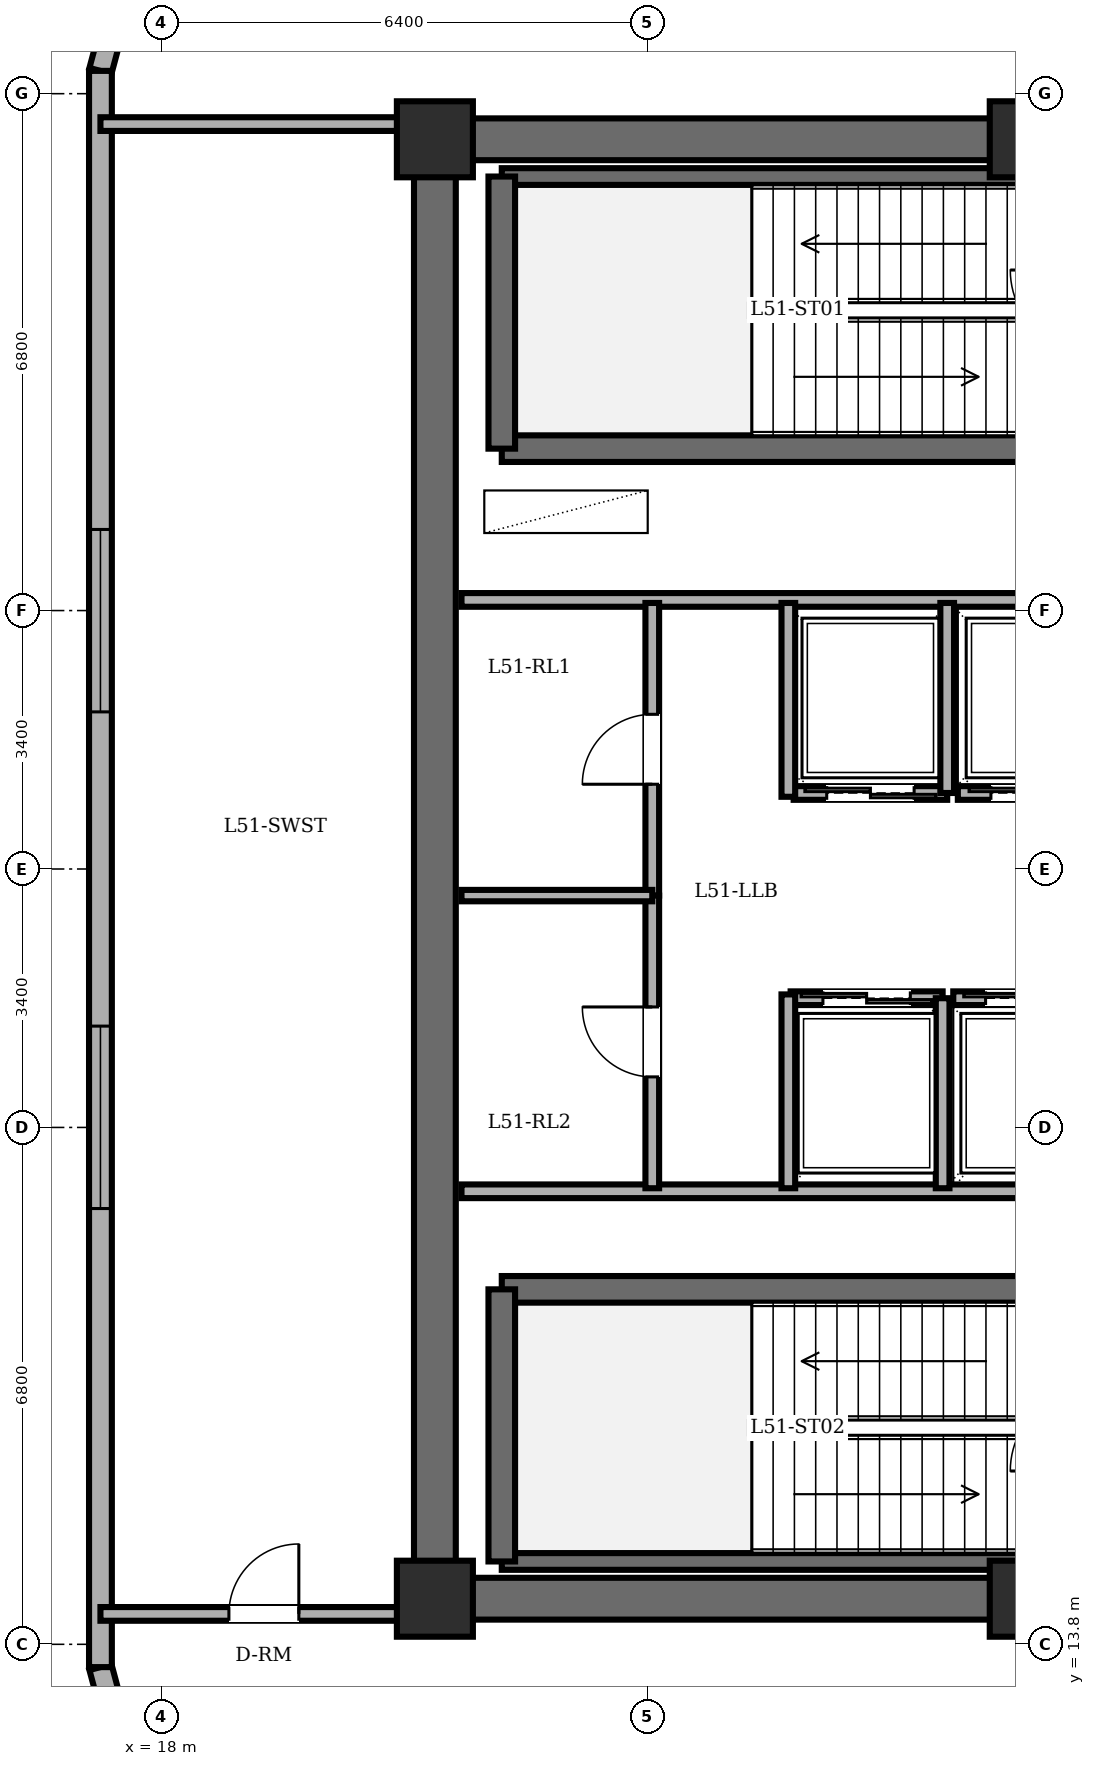
"""IFC4 building model, lengths in metres.
Left out: names, types, materials, properties, quantities, classifications, styles, units other than length and angle.
Written with IfcOpenShell. Run it as: python <this file> out.ifc"""

import sys

from ifc_helpers import new_model, si_unit, direction, frame, frame_2d, origin, origin_2d, place, context, subcontext, project, spatial, rectangle, extrude, element, fill, save


model = new_model("IFC4")
c1 = context("Model", 3, precision=1e-05, world=origin(), true_north=direction((0.0, 1.0)))
c2 = subcontext(c1, "Body", "Model", "MODEL_VIEW")
j1 = project(units=[si_unit("LENGTHUNIT", "METRE"), si_unit("PLANEANGLEUNIT", "RADIAN")], contexts=[c1])
p1 = place(None, origin())
s1 = spatial("IfcSite", under=j1, at=p1, CompositionType="ELEMENT")
p2 = place(p1, origin())
s2 = spatial("IfcBuilding", under=s1, at=p2, CompositionType="ELEMENT")
p3 = place(p2, frame((0.0, 0.0, 196.2)))
s3 = spatial("IfcBuildingStorey", under=s2, at=p3, CompositionType="ELEMENT", Elevation=196.2)
for number, where, z_axis, x_axis in (
    (1, (21.6, 14.4, 0.0), (0.0, 0.0, 1.0), (1.0, 0.0, 0.0)),
    (2, (29.4, 14.4, 0.0), (0.0, 0.0, 1.0), (1.0, 0.0, 0.0)),
    (3, (29.4, 33.6, 0.0), (0.0, 0.0, 1.0), (1.0, 0.0, 0.0)),
    (4, (21.6, 33.6, 0.0), (0.0, 0.0, 1.0), (1.0, 0.0, 0.0)),
):
    element("IfcColumn", number, at=place(p3, frame(where, z_axis=z_axis, x_axis=x_axis)), inside=s3, PredefinedType="COLUMN", context=c2, shape_type="SweptSolid", body=[
        extrude(rectangle(XDim=1.0, YDim=1.0, at=origin_2d()), origin(), (0.0, 0.0, 1.0), 5.1),
    ])
for number, where, z_axis, x_axis in (
    (5, (17.2, 13.5, 0.0), (0.0, 0.0, 1.0), (0.259, -0.966, 0.0)),
    (6, (17.897, 37.1, 0.0), (0.0, 0.0, 1.0), (-0.259, -0.966, 0.0)),
):
    element("IfcWall", number, at=place(p3, frame(where, z_axis=z_axis, x_axis=x_axis)), inside=s3, PredefinedType="SOLIDWALL", context=c2, shape_type="SweptSolid", body=[
        extrude(rectangle(XDim=2.692, YDim=0.3, at=frame_2d((1.346, 0.0))), origin(), (0.0, 0.0, 1.0), 4.9),
    ])
p4 = place(p3, frame((17.2, 34.5, 0.0), z_axis=(0.0, 0.0, 1.0), x_axis=(0.0, -1.0, 0.0)))
e7 = element("IfcWall", 7, at=p4, inside=s3, PredefinedType="SOLIDWALL", context=c2, shape_type="SweptSolid", body=[
    extrude(rectangle(XDim=21.0, YDim=0.3, at=frame_2d((10.5, 0.0))), origin(), (0.0, 0.0, 1.0), 4.9),
])
p5 = place(p4, frame((6.033, 0.0, 0.85)))
e8 = element("IfcOpeningElement", 8, at=p5, cuts=e7, PredefinedType="OPENING", context=c2, shape_type="SweptSolid", body=[
    extrude(rectangle(XDim=2.4, YDim=2.1, at=frame_2d((1.2, 1.05))), frame((0.0, 0.16, 0.0), z_axis=(0.0, -1.0, 0.0), x_axis=(1.0, 0.0, 0.0)), (0.0, 0.0, 1.0), 0.32),
])
p6 = place(p4, frame((12.567, 0.0, 0.85)))
e9 = element("IfcOpeningElement", 9, at=p6, cuts=e7, PredefinedType="OPENING", context=c2, shape_type="SweptSolid", body=[
    extrude(rectangle(XDim=2.4, YDim=2.1, at=frame_2d((1.2, 1.05))), frame((0.0, 0.16, 0.0), z_axis=(0.0, -1.0, 0.0), x_axis=(1.0, 0.0, 0.0)), (0.0, 0.0, 1.0), 0.32),
])
p7 = place(p3, frame((21.6, 14.4, 0.0), z_axis=(0.0, 0.0, 1.0), x_axis=(0.0, 1.0, 0.0)))
e10 = element("IfcWall", 10, at=p7, inside=s3, PredefinedType="SHEAR", context=c2, shape_type="SweptSolid", body=[
    extrude(rectangle(XDim=19.2, YDim=0.55, at=frame_2d((9.6, 0.0))), origin(), (0.0, 0.0, 1.0), 4.9),
])
for number, where, z_axis, x_axis in (
    (11, (21.6, 33.6, 0.0), (0.0, 0.0, 1.0), (1.0, 0.0, 0.0)),
    (12, (37.2, 14.4, 0.0), (0.0, 0.0, 1.0), (-1.0, 0.0, 0.0)),
):
    element("IfcWall", number, at=place(p3, frame(where, z_axis=z_axis, x_axis=x_axis)), inside=s3, PredefinedType="SHEAR", context=c2, shape_type="SweptSolid", body=[
        extrude(rectangle(XDim=15.6, YDim=0.55, at=frame_2d((7.8, 0.0))), origin(), (0.0, 0.0, 1.0), 4.9),
    ])
p8 = place(p3, frame((22.48, 29.53, 0.0), z_axis=(0.0, 0.0, 1.0), x_axis=(1.0, 0.0, 0.0)))
e13 = element("IfcWall", 13, at=p8, inside=s3, PredefinedType="SOLIDWALL", context=c2, shape_type="SweptSolid", body=[
    extrude(rectangle(XDim=7.79, YDim=0.35, at=frame_2d((3.895, 0.0))), origin(), (0.0, 0.0, 1.0), 4.9),
])
p9 = place(p3, frame((22.48, 33.11, 0.0), z_axis=(0.0, 0.0, 1.0), x_axis=(1.0, 0.0, 0.0)))
e14 = element("IfcWall", 14, at=p9, inside=s3, PredefinedType="PARTITIONING", context=c2, shape_type="SweptSolid", body=[
    extrude(rectangle(XDim=7.79, YDim=0.22, at=frame_2d((3.895, 0.0))), origin(), (0.0, 0.0, 1.0), 4.9),
])
p10 = place(p3, frame((22.48, 29.53, 0.0), z_axis=(0.0, 0.0, 1.0), x_axis=(0.0, 1.0, 0.0)))
e15 = element("IfcWall", 15, at=p10, inside=s3, PredefinedType="SOLIDWALL", context=c2, shape_type="SweptSolid", body=[
    extrude(rectangle(XDim=3.58, YDim=0.35, at=frame_2d((1.79, 0.0))), origin(), (0.0, 0.0, 1.0), 4.9),
])
p11 = place(p3, frame((22.48, 18.47, 0.0), z_axis=(0.0, 0.0, 1.0), x_axis=(1.0, 0.0, 0.0)))
e16 = element("IfcWall", 16, at=p11, inside=s3, PredefinedType="SOLIDWALL", context=c2, shape_type="SweptSolid", body=[
    extrude(rectangle(XDim=7.79, YDim=0.35, at=frame_2d((3.895, 0.0))), origin(), (0.0, 0.0, 1.0), 4.9),
])
p12 = place(p3, frame((22.48, 14.89, 0.0), z_axis=(0.0, 0.0, 1.0), x_axis=(1.0, 0.0, 0.0)))
e17 = element("IfcWall", 17, at=p12, inside=s3, PredefinedType="PARTITIONING", context=c2, shape_type="SweptSolid", body=[
    extrude(rectangle(XDim=7.79, YDim=0.22, at=frame_2d((3.895, 0.0))), origin(), (0.0, 0.0, 1.0), 4.9),
])
p13 = place(p3, frame((22.48, 14.89, 0.0), z_axis=(0.0, 0.0, 1.0), x_axis=(0.0, 1.0, 0.0)))
e18 = element("IfcWall", 18, at=p13, inside=s3, PredefinedType="SOLIDWALL", context=c2, shape_type="SweptSolid", body=[
    extrude(rectangle(XDim=3.58, YDim=0.35, at=frame_2d((1.79, 0.0))), origin(), (0.0, 0.0, 1.0), 4.9),
])
p14 = place(p3, frame((21.95, 27.54, 0.0), z_axis=(0.0, 0.0, 1.0), x_axis=(1.0, 0.0, 0.0)))
e19 = element("IfcWall", 19, at=p14, inside=s3, PredefinedType="PARTITIONING", context=c2, shape_type="SweptSolid", body=[
    extrude(rectangle(XDim=10.56, YDim=0.18, at=frame_2d((5.28, 0.0))), origin(), (0.0, 0.0, 1.0), 4.9),
])
p15 = place(p3, frame((21.95, 19.76, 0.0), z_axis=(0.0, 0.0, 1.0), x_axis=(1.0, 0.0, 0.0)))
e20 = element("IfcWall", 20, at=p15, inside=s3, PredefinedType="PARTITIONING", context=c2, shape_type="SweptSolid", body=[
    extrude(rectangle(XDim=14.87, YDim=0.18, at=frame_2d((7.435, 0.0))), origin(), (0.0, 0.0, 1.0), 4.9),
])
p16 = place(p3, frame((28.34, 25.0, 0.0), z_axis=(0.0, 0.0, 1.0), x_axis=(-1.0, 0.0, 0.0)))
e21 = element("IfcWall", 21, at=p16, inside=s3, PredefinedType="PARTITIONING", context=c2, shape_type="SweptSolid", body=[
    extrude(rectangle(XDim=2.02, YDim=0.18, at=frame_2d((1.01, 0.0))), origin(), (0.0, 0.0, 1.0), 4.9),
])
p17 = place(p16, frame((0.435, 0.0, 0.0)))
e22 = element("IfcOpeningElement", 22, at=p17, cuts=e21, PredefinedType="OPENING", context=c2, shape_type="SweptSolid", body=[
    extrude(rectangle(XDim=1.15, YDim=2.2, at=frame_2d((0.575, 1.1))), frame((0.0, 0.1, 0.0), z_axis=(0.0, -1.0, 0.0), x_axis=(1.0, 0.0, 0.0)), (0.0, 0.0, 1.0), 0.2),
])
p18 = place(p3, frame((28.34, 25.0, 0.0), z_axis=(0.0, 0.0, 1.0), x_axis=(0.0, 1.0, 0.0)))
e23 = element("IfcWall", 23, at=p18, inside=s3, PredefinedType="PARTITIONING", context=c2, shape_type="SweptSolid", body=[
    extrude(rectangle(XDim=2.5, YDim=0.18, at=frame_2d((1.25, 0.0))), origin(), (0.0, 0.0, 1.0), 4.9),
])
p19 = place(p3, frame((30.5, 25.0, 0.0), z_axis=(0.0, 0.0, 1.0), x_axis=(-1.0, 0.0, 0.0)))
e24 = element("IfcWall", 24, at=p19, inside=s3, PredefinedType="PARTITIONING", context=c2, shape_type="SweptSolid", body=[
    extrude(rectangle(XDim=2.02, YDim=0.18, at=frame_2d((1.01, 0.0))), origin(), (0.0, 0.0, 1.0), 4.9),
])
p20 = place(p19, frame((0.435, 0.0, 0.0)))
e25 = element("IfcOpeningElement", 25, at=p20, cuts=e24, PredefinedType="OPENING", context=c2, shape_type="SweptSolid", body=[
    extrude(rectangle(XDim=1.15, YDim=2.2, at=frame_2d((0.575, 1.1))), frame((0.0, 0.1, 0.0), z_axis=(0.0, -1.0, 0.0), x_axis=(1.0, 0.0, 0.0)), (0.0, 0.0, 1.0), 0.2),
])
p21 = place(p3, frame((26.28, 22.3, 0.0), z_axis=(0.0, 0.0, 1.0), x_axis=(1.0, 0.0, 0.0)))
e26 = element("IfcWall", 26, at=p21, inside=s3, PredefinedType="PARTITIONING", context=c2, shape_type="SweptSolid", body=[
    extrude(rectangle(XDim=2.0, YDim=0.18, at=frame_2d((1.0, 0.0))), origin(), (0.0, 0.0, 1.0), 4.9),
])
p22 = place(p21, frame((0.425, 0.0, 0.0)))
e27 = element("IfcOpeningElement", 27, at=p22, cuts=e26, PredefinedType="OPENING", context=c2, shape_type="SweptSolid", body=[
    extrude(rectangle(XDim=1.15, YDim=2.2, at=frame_2d((0.575, 1.1))), frame((0.0, 0.1, 0.0), z_axis=(0.0, -1.0, 0.0), x_axis=(1.0, 0.0, 0.0)), (0.0, 0.0, 1.0), 0.2),
])
p23 = place(p3, frame((28.28, 19.8, 0.0), z_axis=(0.0, 0.0, 1.0), x_axis=(0.0, 1.0, 0.0)))
e28 = element("IfcWall", 28, at=p23, inside=s3, PredefinedType="PARTITIONING", context=c2, shape_type="SweptSolid", body=[
    extrude(rectangle(XDim=2.5, YDim=0.18, at=frame_2d((1.25, 0.0))), origin(), (0.0, 0.0, 1.0), 4.9),
])
p24 = place(p3, frame((28.42, 22.3, 0.0), z_axis=(0.0, 0.0, 1.0), x_axis=(1.0, 0.0, 0.0)))
e29 = element("IfcWall", 29, at=p24, inside=s3, PredefinedType="PARTITIONING", context=c2, shape_type="SweptSolid", body=[
    extrude(rectangle(XDim=2.0, YDim=0.18, at=frame_2d((1.0, 0.0))), origin(), (0.0, 0.0, 1.0), 4.9),
])
p25 = place(p24, frame((0.425, 0.0, 0.0)))
e30 = element("IfcOpeningElement", 30, at=p25, cuts=e29, PredefinedType="OPENING", context=c2, shape_type="SweptSolid", body=[
    extrude(rectangle(XDim=1.15, YDim=2.2, at=frame_2d((0.575, 1.1))), frame((0.0, 0.1, 0.0), z_axis=(0.0, -1.0, 0.0), x_axis=(1.0, 0.0, 0.0)), (0.0, 0.0, 1.0), 0.2),
])
p26 = place(p3, frame((24.46, 23.65, 0.0), z_axis=(0.0, 0.0, 1.0), x_axis=(0.0, 1.0, 0.0)))
e31 = element("IfcWall", 31, at=p26, inside=s3, PredefinedType="PARTITIONING", context=c2, shape_type="SweptSolid", body=[
    extrude(rectangle(XDim=3.85, YDim=0.18, at=frame_2d((1.925, 0.0))), origin(), (0.0, 0.0, 1.0), 4.9),
])
p27 = place(p26, frame((1.465, 0.0, 0.0)))
e32 = element("IfcOpeningElement", 32, at=p27, cuts=e31, PredefinedType="OPENING", context=c2, shape_type="SweptSolid", body=[
    extrude(rectangle(XDim=0.92, YDim=2.1, at=frame_2d((0.46, 1.05))), frame((0.0, 0.1, 0.0), z_axis=(0.0, -1.0, 0.0), x_axis=(1.0, 0.0, 0.0)), (0.0, 0.0, 1.0), 0.2),
])
p28 = place(p3, frame((24.46, 19.8, 0.0), z_axis=(0.0, 0.0, 1.0), x_axis=(0.0, 1.0, 0.0)))
e33 = element("IfcWall", 33, at=p28, inside=s3, PredefinedType="PARTITIONING", context=c2, shape_type="SweptSolid", body=[
    extrude(rectangle(XDim=3.85, YDim=0.18, at=frame_2d((1.925, 0.0))), origin(), (0.0, 0.0, 1.0), 4.9),
])
p29 = place(p28, frame((1.465, 0.0, 0.0)))
e34 = element("IfcOpeningElement", 34, at=p29, cuts=e33, PredefinedType="OPENING", context=c2, shape_type="SweptSolid", body=[
    extrude(rectangle(XDim=0.92, YDim=2.1, at=frame_2d((0.46, 1.05))), frame((0.0, 0.1, 0.0), z_axis=(0.0, -1.0, 0.0), x_axis=(1.0, 0.0, 0.0)), (0.0, 0.0, 1.0), 0.2),
])
p30 = place(p3, frame((21.95, 23.65, 0.0), z_axis=(0.0, 0.0, 1.0), x_axis=(1.0, 0.0, 0.0)))
e35 = element("IfcWall", 35, at=p30, inside=s3, PredefinedType="PARTITIONING", context=c2, shape_type="SweptSolid", body=[
    extrude(rectangle(XDim=2.51, YDim=0.15, at=frame_2d((1.255, 0.0))), origin(), (0.0, 0.0, 1.0), 4.9),
])
for number, where, z_axis, x_axis in (
    (36, (26.25, 24.95, 0.0), (0.0, 0.0, 1.0), (0.0, 1.0, 0.0)),
    (37, (26.25, 19.8, 0.0), (0.0, 0.0, 1.0), (0.0, 1.0, 0.0)),
):
    element("IfcWall", number, at=place(p3, frame(where, z_axis=z_axis, x_axis=x_axis)), inside=s3, PredefinedType="PARTITIONING", context=c2, shape_type="SweptSolid", body=[
        extrude(rectangle(XDim=2.55, YDim=0.18, at=frame_2d((1.275, 0.0))), origin(), (0.0, 0.0, 1.0), 4.9),
    ])
p31 = place(p3, frame((17.2, 14.2, 0.0), z_axis=(0.0, 0.0, 1.0), x_axis=(1.0, 0.0, 0.0)))
e38 = element("IfcWall", 38, at=p31, inside=s3, PredefinedType="PARTITIONING", context=c2, shape_type="SweptSolid", body=[
    extrude(rectangle(XDim=4.3, YDim=0.18, at=frame_2d((2.15, 0.0))), origin(), (0.0, 0.0, 1.0), 4.9),
])
p32 = place(p31, frame((1.69, 0.0, 0.0)))
e39 = element("IfcOpeningElement", 39, at=p32, cuts=e38, PredefinedType="OPENING", context=c2, shape_type="SweptSolid", body=[
    extrude(rectangle(XDim=0.92, YDim=2.1, at=frame_2d((0.46, 1.05))), frame((0.0, 0.1, 0.0), z_axis=(0.0, -1.0, 0.0), x_axis=(1.0, 0.0, 0.0)), (0.0, 0.0, 1.0), 0.2),
])
p33 = place(p3, frame((17.2, 33.8, 0.0), z_axis=(0.0, 0.0, 1.0), x_axis=(1.0, 0.0, 0.0)))
e40 = element("IfcWall", 40, at=p33, inside=s3, PredefinedType="PARTITIONING", context=c2, shape_type="SweptSolid", body=[
    extrude(rectangle(XDim=4.3, YDim=0.18, at=frame_2d((2.15, 0.0))), origin(), (0.0, 0.0, 1.0), 4.9),
])
p34 = place(p5, origin())
e41 = element("IfcWindow", 41, at=p34, inside=s3, PartitioningType="TRIPLE_PANEL_VERTICAL", PredefinedType="WINDOW", context=c2, shape_type="SweptSolid", body=[
    extrude(rectangle(XDim=2.4, YDim=2.1, at=frame_2d((1.2, 1.05))), frame((0.0, 0.03, 0.0), z_axis=(0.0, -1.0, 0.0), x_axis=(1.0, 0.0, 0.0)), (0.0, 0.0, 1.0), 0.06),
])
fill(e8, e41)
p35 = place(p6, origin())
e42 = element("IfcWindow", 42, at=p35, inside=s3, PartitioningType="TRIPLE_PANEL_VERTICAL", PredefinedType="WINDOW", context=c2, shape_type="SweptSolid", body=[
    extrude(rectangle(XDim=2.4, YDim=2.1, at=frame_2d((1.2, 1.05))), frame((0.0, 0.03, 0.0), z_axis=(0.0, -1.0, 0.0), x_axis=(1.0, 0.0, 0.0)), (0.0, 0.0, 1.0), 0.06),
])
fill(e9, e42)
p36 = place(p17, origin())
e43 = element("IfcDoor", 43, at=p36, inside=s3, OperationType="DOUBLE_DOOR_SLIDING", PredefinedType="DOOR", context=c2, shape_type="SweptSolid", body=[
    extrude(rectangle(XDim=1.15, YDim=2.2, at=frame_2d((0.575, 1.1))), frame((0.0, 0.025, 0.0), z_axis=(0.0, -1.0, 0.0), x_axis=(1.0, 0.0, 0.0)), (0.0, 0.0, 1.0), 0.05),
])
fill(e22, e43)
p37 = place(p20, origin())
e44 = element("IfcDoor", 44, at=p37, inside=s3, OperationType="DOUBLE_DOOR_SLIDING", PredefinedType="DOOR", context=c2, shape_type="SweptSolid", body=[
    extrude(rectangle(XDim=1.15, YDim=2.2, at=frame_2d((0.575, 1.1))), frame((0.0, 0.025, 0.0), z_axis=(0.0, -1.0, 0.0), x_axis=(1.0, 0.0, 0.0)), (0.0, 0.0, 1.0), 0.05),
])
fill(e25, e44)
p38 = place(p22, origin())
e45 = element("IfcDoor", 45, at=p38, inside=s3, OperationType="DOUBLE_DOOR_SLIDING", PredefinedType="DOOR", context=c2, shape_type="SweptSolid", body=[
    extrude(rectangle(XDim=1.15, YDim=2.2, at=frame_2d((0.575, 1.1))), frame((0.0, 0.025, 0.0), z_axis=(0.0, -1.0, 0.0), x_axis=(1.0, 0.0, 0.0)), (0.0, 0.0, 1.0), 0.05),
])
fill(e27, e45)
p39 = place(p25, origin())
e46 = element("IfcDoor", 46, at=p39, inside=s3, OperationType="DOUBLE_DOOR_SLIDING", PredefinedType="DOOR", context=c2, shape_type="SweptSolid", body=[
    extrude(rectangle(XDim=1.15, YDim=2.2, at=frame_2d((0.575, 1.1))), frame((0.0, 0.025, 0.0), z_axis=(0.0, -1.0, 0.0), x_axis=(1.0, 0.0, 0.0)), (0.0, 0.0, 1.0), 0.05),
])
fill(e30, e46)
p40 = place(p27, origin())
e47 = element("IfcDoor", 47, at=p40, inside=s3, OperationType="SINGLE_SWING_LEFT", PredefinedType="DOOR", context=c2, shape_type="SweptSolid", body=[
    extrude(rectangle(XDim=0.92, YDim=2.1, at=frame_2d((0.46, 1.05))), frame((0.0, 0.025, 0.0), z_axis=(0.0, -1.0, 0.0), x_axis=(1.0, 0.0, 0.0)), (0.0, 0.0, 1.0), 0.05),
])
fill(e32, e47)
p41 = place(p29, origin())
e48 = element("IfcDoor", 48, at=p41, inside=s3, OperationType="SINGLE_SWING_RIGHT", PredefinedType="DOOR", context=c2, shape_type="SweptSolid", body=[
    extrude(rectangle(XDim=0.92, YDim=2.1, at=frame_2d((0.46, 1.05))), frame((0.0, 0.025, 0.0), z_axis=(0.0, -1.0, 0.0), x_axis=(1.0, 0.0, 0.0)), (0.0, 0.0, 1.0), 0.05),
])
fill(e34, e48)
p42 = place(p32, origin())
e49 = element("IfcDoor", 49, at=p42, inside=s3, OperationType="SINGLE_SWING_RIGHT", PredefinedType="DOOR", context=c2, shape_type="SweptSolid", body=[
    extrude(rectangle(XDim=0.92, YDim=2.1, at=frame_2d((0.46, 1.05))), frame((0.0, 0.025, 0.0), z_axis=(0.0, -1.0, 0.0), x_axis=(1.0, 0.0, 0.0)), (0.0, 0.0, 1.0), 0.05),
])
fill(e39, e49)
save(model, sys.argv[1])
